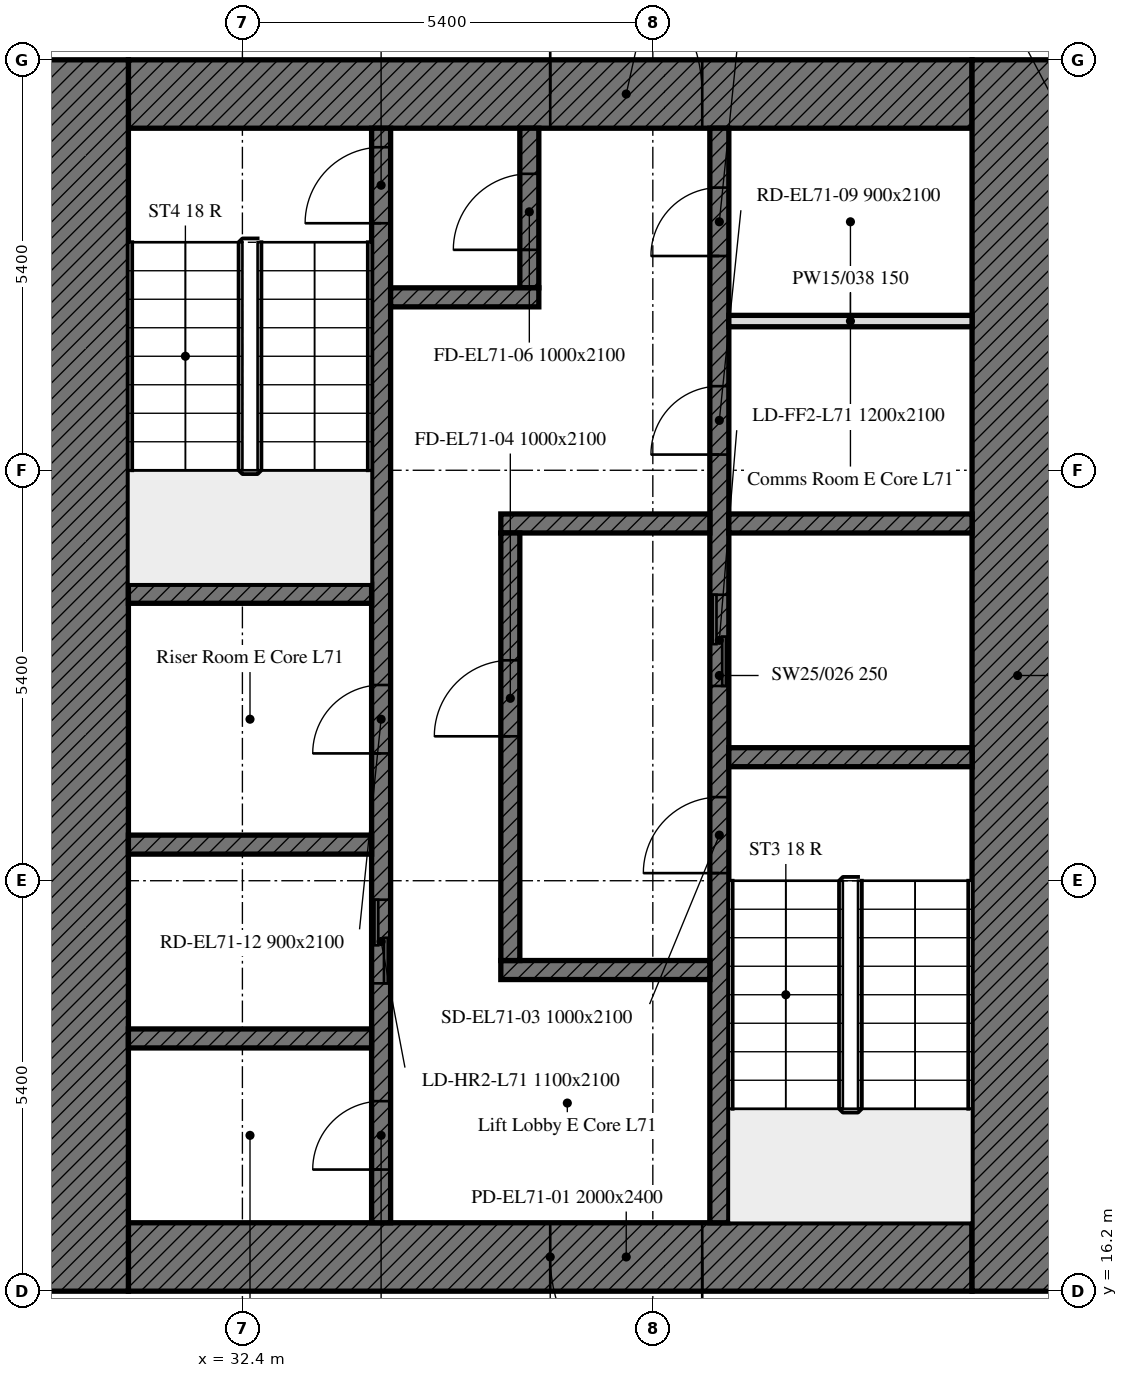
"""IFC4 building model, lengths in metres.
Left out: names, types, materials, properties, quantities, classifications, styles, units other than length and angle.
Written with IfcOpenShell. Run it as: python <this file> out.ifc"""

import sys

from ifc_helpers import new_model, si_unit, direction, frame, frame_2d, origin, place, context, subcontext, project, spatial, rectangle, extrude, element, fill, save


model = new_model("IFC4")
c1 = context("Model", 3, precision=1e-05, world=origin(), true_north=direction((0.0, 1.0)))
c2 = subcontext(c1, "Body", "Model", "MODEL_VIEW")
j1 = project(units=[si_unit("LENGTHUNIT", "METRE"), si_unit("PLANEANGLEUNIT", "RADIAN")], contexts=[c1])
p1 = place(None, origin())
s1 = spatial("IfcSite", under=j1, at=p1, CompositionType="ELEMENT")
p2 = place(p1, origin())
s2 = spatial("IfcBuilding", under=s1, at=p2, CompositionType="ELEMENT")
p3 = place(p2, frame((0.0, 0.0, 288.4)))
s3 = spatial("IfcBuildingStorey", under=s2, at=p3, CompositionType="ELEMENT", Elevation=288.4)
p4 = place(p3, frame((42.0, 16.65, 0.0), z_axis=(0.0, 0.0, 1.0), x_axis=(-1.0, 0.0, 0.0)))
e1 = element("IfcWall", 1, at=p4, inside=s3, PredefinedType="SOLIDWALL", context=c2, shape_type="SweptSolid", body=[
    extrude(rectangle(XDim=11.1, YDim=0.9, at=frame_2d((5.55, 0.0))), origin(), (0.0, 0.0, 1.0), 3.0),
])
p5 = place(p4, frame((3.55, 0.0, 0.0)))
e2 = element("IfcOpeningElement", 2, at=p5, cuts=e1, PredefinedType="OPENING", context=c2, shape_type="SweptSolid", body=[
    extrude(rectangle(XDim=2.0, YDim=2.4, at=frame_2d((1.0, 1.2))), frame((0.0, 0.45, 0.0), z_axis=(0.0, -1.0, 0.0), x_axis=(1.0, 0.0, 0.0)), (0.0, 0.0, 1.0), 0.9),
])
p6 = place(p3, frame((30.9, 31.95, 0.0), z_axis=(0.0, 0.0, 1.0), x_axis=(1.0, 0.0, 0.0)))
e3 = element("IfcWall", 3, at=p6, inside=s3, PredefinedType="SOLIDWALL", context=c2, shape_type="SweptSolid", body=[
    extrude(rectangle(XDim=11.1, YDim=0.9, at=frame_2d((5.55, 0.0))), origin(), (0.0, 0.0, 1.0), 3.0),
])
p7 = place(p6, frame((5.55, 0.0, 0.0)))
e4 = element("IfcOpeningElement", 4, at=p7, cuts=e3, PredefinedType="OPENING", context=c2, shape_type="SweptSolid", body=[
    extrude(rectangle(XDim=2.0, YDim=2.4, at=frame_2d((1.0, 1.2))), frame((0.0, 0.45, 0.0), z_axis=(0.0, -1.0, 0.0), x_axis=(1.0, 0.0, 0.0)), (0.0, 0.0, 1.0), 0.9),
])
for number, where, z_axis, x_axis in (
    (5, (42.6, 32.4, 0.0), (0.0, 0.0, 1.0), (0.0, -1.0, 0.0)),
    (6, (30.3, 16.2, 0.0), (0.0, 0.0, 1.0), (0.0, 1.0, 0.0)),
):
    element("IfcWall", number, at=place(p3, frame(where, z_axis=z_axis, x_axis=x_axis)), inside=s3, PredefinedType="SOLIDWALL", context=c2, shape_type="SweptSolid", body=[
        extrude(rectangle(XDim=16.2, YDim=1.2, at=frame_2d((8.1, 0.0))), origin(), (0.0, 0.0, 1.0), 3.0),
    ])
p8 = place(p3, frame((38.675, 17.1, 0.0), z_axis=(0.0, 0.0, 1.0), x_axis=(0.0, 1.0, 0.0)))
e7 = element("IfcWall", 7, at=p8, inside=s3, PredefinedType="SOLIDWALL", context=c2, shape_type="SweptSolid", body=[
    extrude(rectangle(XDim=14.4, YDim=0.25, at=frame_2d((7.2, 0.0))), origin(), (0.0, 0.0, 1.0), 3.0),
])
p9 = place(p8, frame((4.6, 0.0, 0.0)))
e8 = element("IfcOpeningElement", 8, at=p9, cuts=e7, PredefinedType="OPENING", context=c2, shape_type="SweptSolid", body=[
    extrude(rectangle(XDim=1.0, YDim=2.1, at=frame_2d((0.5, 1.05))), frame((0.0, 0.125, 0.0), z_axis=(0.0, -1.0, 0.0), x_axis=(1.0, 0.0, 0.0)), (0.0, 0.0, 1.0), 0.25),
])
p10 = place(p8, frame((7.062, 0.0, 0.0)))
e9 = element("IfcOpeningElement", 9, at=p10, cuts=e7, PredefinedType="OPENING", context=c2, shape_type="SweptSolid", body=[
    extrude(rectangle(XDim=1.2, YDim=2.1, at=frame_2d((0.6, 1.05))), frame((0.0, 0.125, 0.0), z_axis=(0.0, -1.0, 0.0), x_axis=(1.0, 0.0, 0.0)), (0.0, 0.0, 1.0), 0.25),
])
p11 = place(p8, frame((10.106, 0.0, 0.0)))
e10 = element("IfcOpeningElement", 10, at=p11, cuts=e7, PredefinedType="OPENING", context=c2, shape_type="SweptSolid", body=[
    extrude(rectangle(XDim=0.9, YDim=2.1, at=frame_2d((0.45, 1.05))), frame((0.0, 0.125, 0.0), z_axis=(0.0, -1.0, 0.0), x_axis=(1.0, 0.0, 0.0)), (0.0, 0.0, 1.0), 0.25),
])
p12 = place(p8, frame((12.719, 0.0, 0.0)))
e11 = element("IfcOpeningElement", 11, at=p12, cuts=e7, PredefinedType="OPENING", context=c2, shape_type="SweptSolid", body=[
    extrude(rectangle(XDim=0.9, YDim=2.1, at=frame_2d((0.45, 1.05))), frame((0.0, 0.125, 0.0), z_axis=(0.0, -1.0, 0.0), x_axis=(1.0, 0.0, 0.0)), (0.0, 0.0, 1.0), 0.25),
])
p13 = place(p3, frame((34.225, 17.1, 0.0), z_axis=(0.0, 0.0, 1.0), x_axis=(0.0, 1.0, 0.0)))
e12 = element("IfcWall", 12, at=p13, inside=s3, PredefinedType="SOLIDWALL", context=c2, shape_type="SweptSolid", body=[
    extrude(rectangle(XDim=14.4, YDim=0.25, at=frame_2d((7.2, 0.0))), origin(), (0.0, 0.0, 1.0), 3.0),
])
p14 = place(p13, frame((13.15, 0.0, 0.0)))
e13 = element("IfcOpeningElement", 13, at=p14, cuts=e12, PredefinedType="OPENING", context=c2, shape_type="SweptSolid", body=[
    extrude(rectangle(XDim=1.0, YDim=2.1, at=frame_2d((0.5, 1.05))), frame((0.0, 0.125, 0.0), z_axis=(0.0, -1.0, 0.0), x_axis=(1.0, 0.0, 0.0)), (0.0, 0.0, 1.0), 0.25),
])
p15 = place(p13, frame((3.15, 0.0, 0.0)))
e14 = element("IfcOpeningElement", 14, at=p15, cuts=e12, PredefinedType="OPENING", context=c2, shape_type="SweptSolid", body=[
    extrude(rectangle(XDim=1.1, YDim=2.1, at=frame_2d((0.55, 1.05))), frame((0.0, 0.125, 0.0), z_axis=(0.0, -1.0, 0.0), x_axis=(1.0, 0.0, 0.0)), (0.0, 0.0, 1.0), 0.25),
])
p16 = place(p13, frame((0.7, 0.0, 0.0)))
e15 = element("IfcOpeningElement", 15, at=p16, cuts=e12, PredefinedType="OPENING", context=c2, shape_type="SweptSolid", body=[
    extrude(rectangle(XDim=0.9, YDim=2.1, at=frame_2d((0.45, 1.05))), frame((0.0, 0.125, 0.0), z_axis=(0.0, -1.0, 0.0), x_axis=(1.0, 0.0, 0.0)), (0.0, 0.0, 1.0), 0.25),
])
p17 = place(p13, frame((6.175, 0.0, 0.0)))
e16 = element("IfcOpeningElement", 16, at=p17, cuts=e12, PredefinedType="OPENING", context=c2, shape_type="SweptSolid", body=[
    extrude(rectangle(XDim=0.9, YDim=2.1, at=frame_2d((0.45, 1.05))), frame((0.0, 0.125, 0.0), z_axis=(0.0, -1.0, 0.0), x_axis=(1.0, 0.0, 0.0)), (0.0, 0.0, 1.0), 0.25),
])
p18 = place(p3, frame((38.8, 23.225, 0.0), z_axis=(0.0, 0.0, 1.0), x_axis=(1.0, 0.0, 0.0)))
e17 = element("IfcWall", 17, at=p18, inside=s3, PredefinedType="SOLIDWALL", context=c2, shape_type="SweptSolid", body=[
    extrude(rectangle(XDim=3.2, YDim=0.25, at=frame_2d((1.6, 0.0))), origin(), (0.0, 0.0, 1.0), 3.0),
])
for number, where, z_axis, x_axis in (
    (18, (30.9, 25.375, 0.0), (0.0, 0.0, 1.0), (1.0, 0.0, 0.0)),
    (19, (30.9, 22.075, 0.0), (0.0, 0.0, 1.0), (1.0, 0.0, 0.0)),
):
    element("IfcWall", number, at=place(p3, frame(where, z_axis=z_axis, x_axis=x_axis)), inside=s3, PredefinedType="SOLIDWALL", context=c2, shape_type="SweptSolid", body=[
        extrude(rectangle(XDim=3.2, YDim=0.25, at=frame_2d((1.6, 0.0))), origin(), (0.0, 0.0, 1.0), 3.0),
    ])
p19 = place(p3, frame((38.8, 26.3, 0.0), z_axis=(0.0, 0.0, 1.0), x_axis=(1.0, 0.0, 0.0)))
e20 = element("IfcWall", 20, at=p19, inside=s3, PredefinedType="SOLIDWALL", context=c2, shape_type="SweptSolid", body=[
    extrude(rectangle(XDim=3.2, YDim=0.25, at=frame_2d((1.6, 0.0))), origin(), (0.0, 0.0, 1.0), 3.0),
])
for number, where, z_axis, x_axis in (
    (21, (35.8, 26.3, 0.0), (0.0, 0.0, 1.0), (1.0, 0.0, 0.0)),
    (22, (35.8, 20.425, 0.0), (0.0, 0.0, 1.0), (1.0, 0.0, 0.0)),
):
    element("IfcWall", number, at=place(p3, frame(where, z_axis=z_axis, x_axis=x_axis)), inside=s3, PredefinedType="SOLIDWALL", context=c2, shape_type="SweptSolid", body=[
        extrude(rectangle(XDim=2.75, YDim=0.25, at=frame_2d((1.375, 0.0))), origin(), (0.0, 0.0, 1.0), 3.0),
    ])
p20 = place(p3, frame((36.175, 29.4, 0.0), z_axis=(0.0, 0.0, 1.0), x_axis=(0.0, 1.0, 0.0)))
e23 = element("IfcWall", 23, at=p20, inside=s3, PredefinedType="SOLIDWALL", context=c2, shape_type="SweptSolid", body=[
    extrude(rectangle(XDim=2.1, YDim=0.25, at=frame_2d((1.05, 0.0))), origin(), (0.0, 0.0, 1.0), 3.0),
])
p21 = place(p20, frame((0.5, 0.0, 0.0)))
e24 = element("IfcOpeningElement", 24, at=p21, cuts=e23, PredefinedType="OPENING", context=c2, shape_type="SweptSolid", body=[
    extrude(rectangle(XDim=1.0, YDim=2.1, at=frame_2d((0.5, 1.05))), frame((0.0, 0.125, 0.0), z_axis=(0.0, -1.0, 0.0), x_axis=(1.0, 0.0, 0.0)), (0.0, 0.0, 1.0), 0.25),
])
p22 = place(p3, frame((34.35, 29.275, 0.0), z_axis=(0.0, 0.0, 1.0), x_axis=(1.0, 0.0, 0.0)))
e25 = element("IfcWall", 25, at=p22, inside=s3, PredefinedType="SOLIDWALL", context=c2, shape_type="SweptSolid", body=[
    extrude(rectangle(XDim=1.95, YDim=0.25, at=frame_2d((0.975, 0.0))), origin(), (0.0, 0.0, 1.0), 3.0),
])
p23 = place(p3, frame((35.925, 20.55, 0.0), z_axis=(0.0, 0.0, 1.0), x_axis=(0.0, 1.0, 0.0)))
e26 = element("IfcWall", 26, at=p23, inside=s3, PredefinedType="SOLIDWALL", context=c2, shape_type="SweptSolid", body=[
    extrude(rectangle(XDim=5.625, YDim=0.25, at=frame_2d((2.812, 0.0))), origin(), (0.0, 0.0, 1.0), 3.0),
])
p24 = place(p23, frame((2.95, 0.0, 0.0)))
e27 = element("IfcOpeningElement", 27, at=p24, cuts=e26, PredefinedType="OPENING", context=c2, shape_type="SweptSolid", body=[
    extrude(rectangle(XDim=1.0, YDim=2.1, at=frame_2d((0.5, 1.05))), frame((0.0, 0.125, 0.0), z_axis=(0.0, -1.0, 0.0), x_axis=(1.0, 0.0, 0.0)), (0.0, 0.0, 1.0), 0.25),
])
p25 = place(p3, frame((30.9, 19.525, 0.0), z_axis=(0.0, 0.0, 1.0), x_axis=(1.0, 0.0, 0.0)))
e28 = element("IfcWall", 28, at=p25, inside=s3, PredefinedType="SOLIDWALL", context=c2, shape_type="SweptSolid", body=[
    extrude(rectangle(XDim=3.2, YDim=0.25, at=frame_2d((1.6, 0.0))), origin(), (0.0, 0.0, 1.0), 3.0),
])
p26 = place(p3, frame((38.8, 28.963, 0.0), z_axis=(0.0, 0.0, 1.0), x_axis=(1.0, 0.0, 0.0)))
e29 = element("IfcWall", 29, at=p26, inside=s3, PredefinedType="PARTITIONING", context=c2, shape_type="SweptSolid", body=[
    extrude(rectangle(XDim=3.2, YDim=0.15, at=frame_2d((1.6, 0.0))), origin(), (0.0, 0.0, 1.0), 3.0),
])
p27 = place(p5, origin())
e30 = element("IfcDoor", 30, at=p27, inside=s3, OperationType="DOUBLE_DOOR_SINGLE_SWING", PredefinedType="DOOR", context=c2, shape_type="SweptSolid", body=[
    extrude(rectangle(XDim=2.0, YDim=2.4, at=frame_2d((1.0, 1.2))), frame((0.0, 0.025, 0.0), z_axis=(0.0, -1.0, 0.0), x_axis=(1.0, 0.0, 0.0)), (0.0, 0.0, 1.0), 0.05),
])
fill(e2, e30)
p28 = place(p7, origin())
e31 = element("IfcDoor", 31, at=p28, inside=s3, OperationType="DOUBLE_DOOR_SINGLE_SWING", PredefinedType="DOOR", context=c2, shape_type="SweptSolid", body=[
    extrude(rectangle(XDim=2.0, YDim=2.4, at=frame_2d((1.0, 1.2))), frame((0.0, 0.025, 0.0), z_axis=(0.0, -1.0, 0.0), x_axis=(1.0, 0.0, 0.0)), (0.0, 0.0, 1.0), 0.05),
])
fill(e4, e31)
p29 = place(p9, origin())
e32 = element("IfcDoor", 32, at=p29, inside=s3, OperationType="SINGLE_SWING_LEFT", PredefinedType="DOOR", context=c2, shape_type="SweptSolid", body=[
    extrude(rectangle(XDim=1.0, YDim=2.1, at=frame_2d((0.5, 1.05))), frame((0.0, 0.025, 0.0), z_axis=(0.0, -1.0, 0.0), x_axis=(1.0, 0.0, 0.0)), (0.0, 0.0, 1.0), 0.05),
])
fill(e8, e32)
p30 = place(p24, origin())
e33 = element("IfcDoor", 33, at=p30, inside=s3, OperationType="SINGLE_SWING_LEFT", PredefinedType="DOOR", context=c2, shape_type="SweptSolid", body=[
    extrude(rectangle(XDim=1.0, YDim=2.1, at=frame_2d((0.5, 1.05))), frame((0.0, 0.025, 0.0), z_axis=(0.0, -1.0, 0.0), x_axis=(1.0, 0.0, 0.0)), (0.0, 0.0, 1.0), 0.05),
])
fill(e27, e33)
p31 = place(p14, origin())
e34 = element("IfcDoor", 34, at=p31, inside=s3, OperationType="SINGLE_SWING_LEFT", PredefinedType="DOOR", context=c2, shape_type="SweptSolid", body=[
    extrude(rectangle(XDim=1.0, YDim=2.1, at=frame_2d((0.5, 1.05))), frame((0.0, 0.025, 0.0), z_axis=(0.0, -1.0, 0.0), x_axis=(1.0, 0.0, 0.0)), (0.0, 0.0, 1.0), 0.05),
])
fill(e13, e34)
p32 = place(p21, origin())
e35 = element("IfcDoor", 35, at=p32, inside=s3, OperationType="SINGLE_SWING_LEFT", PredefinedType="DOOR", context=c2, shape_type="SweptSolid", body=[
    extrude(rectangle(XDim=1.0, YDim=2.1, at=frame_2d((0.5, 1.05))), frame((0.0, 0.025, 0.0), z_axis=(0.0, -1.0, 0.0), x_axis=(1.0, 0.0, 0.0)), (0.0, 0.0, 1.0), 0.05),
])
fill(e24, e35)
p33 = place(p10, origin())
e36 = element("IfcDoor", 36, at=p33, inside=s3, OperationType="DOUBLE_DOOR_SLIDING", PredefinedType="DOOR", context=c2, shape_type="SweptSolid", body=[
    extrude(rectangle(XDim=1.2, YDim=2.1, at=frame_2d((0.6, 1.05))), frame((0.0, 0.025, 0.0), z_axis=(0.0, -1.0, 0.0), x_axis=(1.0, 0.0, 0.0)), (0.0, 0.0, 1.0), 0.05),
])
fill(e9, e36)
p34 = place(p15, origin())
e37 = element("IfcDoor", 37, at=p34, inside=s3, OperationType="DOUBLE_DOOR_SLIDING", PredefinedType="DOOR", context=c2, shape_type="SweptSolid", body=[
    extrude(rectangle(XDim=1.1, YDim=2.1, at=frame_2d((0.55, 1.05))), frame((0.0, 0.025, 0.0), z_axis=(0.0, -1.0, 0.0), x_axis=(1.0, 0.0, 0.0)), (0.0, 0.0, 1.0), 0.05),
])
fill(e14, e37)
p35 = place(p11, origin())
e38 = element("IfcDoor", 38, at=p35, inside=s3, OperationType="SINGLE_SWING_LEFT", PredefinedType="DOOR", context=c2, shape_type="SweptSolid", body=[
    extrude(rectangle(XDim=0.9, YDim=2.1, at=frame_2d((0.45, 1.05))), frame((0.0, 0.025, 0.0), z_axis=(0.0, -1.0, 0.0), x_axis=(1.0, 0.0, 0.0)), (0.0, 0.0, 1.0), 0.05),
])
fill(e10, e38)
p36 = place(p12, origin())
e39 = element("IfcDoor", 39, at=p36, inside=s3, OperationType="SINGLE_SWING_LEFT", PredefinedType="DOOR", context=c2, shape_type="SweptSolid", body=[
    extrude(rectangle(XDim=0.9, YDim=2.1, at=frame_2d((0.45, 1.05))), frame((0.0, 0.025, 0.0), z_axis=(0.0, -1.0, 0.0), x_axis=(1.0, 0.0, 0.0)), (0.0, 0.0, 1.0), 0.05),
])
fill(e11, e39)
p37 = place(p16, origin())
e40 = element("IfcDoor", 40, at=p37, inside=s3, OperationType="SINGLE_SWING_LEFT", PredefinedType="DOOR", context=c2, shape_type="SweptSolid", body=[
    extrude(rectangle(XDim=0.9, YDim=2.1, at=frame_2d((0.45, 1.05))), frame((0.0, 0.025, 0.0), z_axis=(0.0, -1.0, 0.0), x_axis=(1.0, 0.0, 0.0)), (0.0, 0.0, 1.0), 0.05),
])
fill(e15, e40)
p38 = place(p17, origin())
e41 = element("IfcDoor", 41, at=p38, inside=s3, OperationType="SINGLE_SWING_LEFT", PredefinedType="DOOR", context=c2, shape_type="SweptSolid", body=[
    extrude(rectangle(XDim=0.9, YDim=2.1, at=frame_2d((0.45, 1.05))), frame((0.0, 0.025, 0.0), z_axis=(0.0, -1.0, 0.0), x_axis=(1.0, 0.0, 0.0)), (0.0, 0.0, 1.0), 0.05),
])
fill(e16, e41)
save(model, sys.argv[1])
